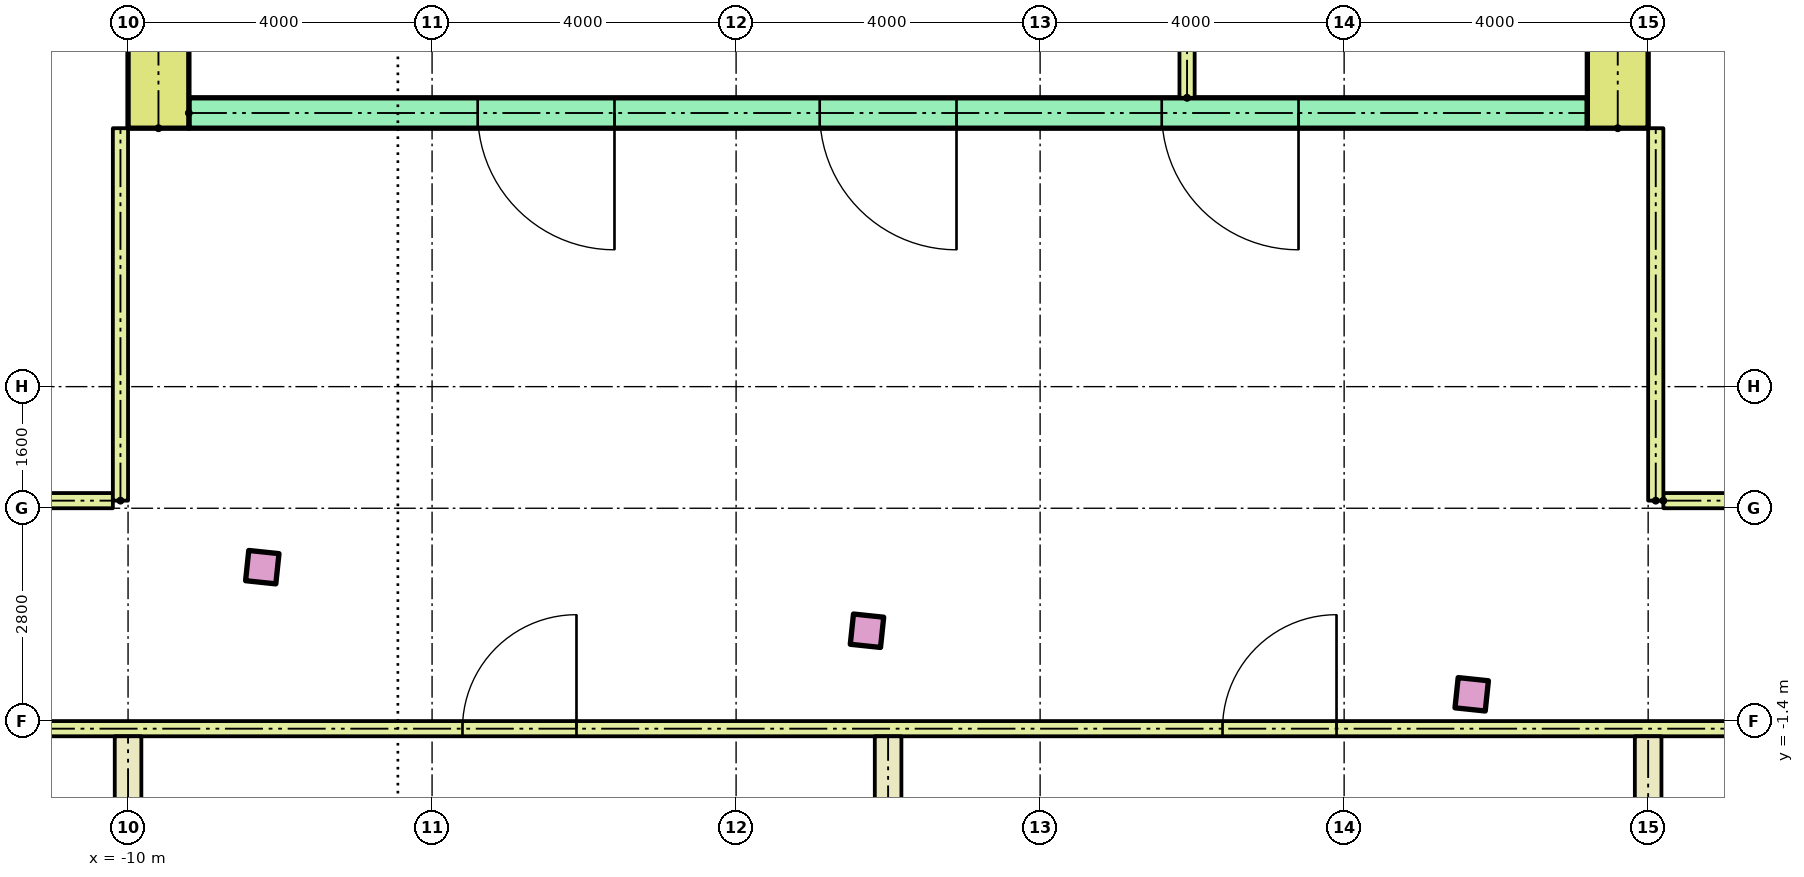
"""IFC4 building model, lengths in metres.
Left out: names, types, materials, properties, quantities, classifications, styles, units other than length and angle.
Written with IfcOpenShell. Run it as: python <this file> out.ifc"""

import sys

from ifc_helpers import new_model, si_unit, direction, frame, frame_2d, origin, origin_2d, place, context, subcontext, project, spatial, rectangle, extrude, element, fill, save


model = new_model("IFC4")
c1 = context("Model", 3, precision=1e-05, world=origin(), true_north=direction((0.0, 1.0)))
c2 = subcontext(c1, "Body", "Model", "MODEL_VIEW")
j1 = project(units=[si_unit("LENGTHUNIT", "METRE"), si_unit("PLANEANGLEUNIT", "RADIAN")], contexts=[c1])
p1 = place(None, origin())
s1 = spatial("IfcSite", under=j1, at=p1, CompositionType="ELEMENT")
p2 = place(p1, origin())
s2 = spatial("IfcBuilding", under=s1, at=p2, CompositionType="ELEMENT")
p3 = place(p2, frame((0.0, 0.0, 309.2)))
s3 = spatial("IfcBuildingStorey", under=s2, at=p3, CompositionType="ELEMENT", Elevation=309.2)
for number, where, z_axis, x_axis in (
    (1, (-8.234, 0.625, 0.0), (0.0, 0.0, 1.0), (0.995, -0.105, 0.0)),
    (2, (-0.278, -0.211, 0.0), (0.0, 0.0, 1.0), (0.995, -0.105, 0.0)),
    (3, (7.678, -1.048, 0.0), (0.0, 0.0, 1.0), (0.995, -0.105, 0.0)),
):
    element("IfcColumn", number, at=place(p3, frame(where, z_axis=z_axis, x_axis=x_axis)), inside=s3, PredefinedType="COLUMN", context=c2, shape_type="SweptSolid", body=[
        extrude(rectangle(XDim=0.4, YDim=0.4, at=origin_2d()), origin(), (0.0, 0.0, 1.0), 3.78),
    ])
for number, where, z_axis, x_axis in (
    (4, (-9.6, 6.4, 0.0), (0.0, 0.0, 1.0), (0.0, 1.0, 0.0)),
    (5, (9.6, 6.4, 0.0), (0.0, 0.0, 1.0), (0.0, 1.0, 0.0)),
):
    element("IfcWall", number, at=place(p3, frame(where, z_axis=z_axis, x_axis=x_axis)), inside=s3, PredefinedType="SHEAR", context=c2, shape_type="SweptSolid", body=[
        extrude(rectangle(XDim=13.6, YDim=0.8, at=frame_2d((6.8, 0.0))), origin(), (0.0, 0.0, 1.0), 3.78),
    ])
p4 = place(p3, frame((-9.2, 6.6, 0.0)))
e6 = element("IfcWall", 6, at=p4, inside=s3, PredefinedType="SHEAR", context=c2, shape_type="SweptSolid", body=[
    extrude(rectangle(XDim=18.4, YDim=0.4, at=frame_2d((9.2, 0.0))), origin(), (0.0, 0.0, 1.0), 3.78),
])
p5 = place(p4, frame((8.3, 0.0, 0.0)))
e7 = element("IfcOpeningElement", 7, at=p5, cuts=e6, PredefinedType="OPENING", context=c2, shape_type="SweptSolid", body=[
    extrude(rectangle(XDim=1.8, YDim=2.1, at=frame_2d((0.9, 1.05))), frame((0.0, 0.21, 0.0), z_axis=(0.0, -1.0, 0.0), x_axis=(1.0, 0.0, 0.0)), (0.0, 0.0, 1.0), 0.42),
])
p6 = place(p4, frame((3.8, 0.0, 0.0)))
e8 = element("IfcOpeningElement", 8, at=p6, cuts=e6, PredefinedType="OPENING", context=c2, shape_type="SweptSolid", body=[
    extrude(rectangle(XDim=1.8, YDim=2.1, at=frame_2d((0.9, 1.05))), frame((0.0, 0.21, 0.0), z_axis=(0.0, -1.0, 0.0), x_axis=(1.0, 0.0, 0.0)), (0.0, 0.0, 1.0), 0.42),
])
p7 = place(p4, frame((12.8, 0.0, 0.0)))
e9 = element("IfcOpeningElement", 9, at=p7, cuts=e6, PredefinedType="OPENING", context=c2, shape_type="SweptSolid", body=[
    extrude(rectangle(XDim=1.8, YDim=2.1, at=frame_2d((0.9, 1.05))), frame((0.0, 0.21, 0.0), z_axis=(0.0, -1.0, 0.0), x_axis=(1.0, 0.0, 0.0)), (0.0, 0.0, 1.0), 0.42),
])
p8 = place(p3, frame((3.933, 6.8, 0.0), z_axis=(0.0, 0.0, 1.0), x_axis=(0.0, 1.0, 0.0)))
e10 = element("IfcWall", 10, at=p8, inside=s3, PredefinedType="PARTITIONING", context=c2, shape_type="SweptSolid", body=[
    extrude(rectangle(XDim=3.3, YDim=0.2, at=frame_2d((1.65, 0.0))), origin(), (0.0, 0.0, 1.0), 3.78),
])
p9 = place(p8, frame((1.1, 0.0, 0.0)))
e11 = element("IfcOpeningElement", 11, at=p9, cuts=e10, PredefinedType="OPENING", context=c2, shape_type="SweptSolid", body=[
    extrude(rectangle(XDim=1.1, YDim=2.1, at=frame_2d((0.55, 1.05))), frame((0.0, 0.11, 0.0), z_axis=(0.0, -1.0, 0.0), x_axis=(1.0, 0.0, 0.0)), (0.0, 0.0, 1.0), 0.22),
])
p10 = place(p3, frame((-17.8, -1.5, 0.0)))
e12 = element("IfcWall", 12, at=p10, inside=s3, PredefinedType="PARTITIONING", context=c2, shape_type="SweptSolid", body=[
    extrude(rectangle(XDim=48.759, YDim=0.2, at=frame_2d((24.379, 0.0))), origin(), (0.0, 0.0, 1.0), 3.78),
])
p11 = place(p10, frame((0.4, 0.0, 0.0)))
e13 = element("IfcOpeningElement", 13, at=p11, cuts=e12, PredefinedType="OPENING", context=c2, shape_type="SweptSolid", body=[
    extrude(rectangle(XDim=1.6, YDim=2.4, at=frame_2d((0.8, 1.2))), frame((0.0, 0.11, 0.0), z_axis=(0.0, -1.0, 0.0), x_axis=(1.0, 0.0, 0.0)), (0.0, 0.0, 1.0), 0.22),
])
p12 = place(p10, frame((12.2, 0.0, 0.0)))
e14 = element("IfcOpeningElement", 14, at=p12, cuts=e12, PredefinedType="OPENING", context=c2, shape_type="SweptSolid", body=[
    extrude(rectangle(XDim=1.5, YDim=2.1, at=frame_2d((0.75, 1.05))), frame((0.0, 0.11, 0.0), z_axis=(0.0, -1.0, 0.0), x_axis=(1.0, 0.0, 0.0)), (0.0, 0.0, 1.0), 0.22),
])
p13 = place(p10, frame((22.2, 0.0, 0.0)))
e15 = element("IfcOpeningElement", 15, at=p13, cuts=e12, PredefinedType="OPENING", context=c2, shape_type="SweptSolid", body=[
    extrude(rectangle(XDim=1.5, YDim=2.1, at=frame_2d((0.75, 1.05))), frame((0.0, 0.11, 0.0), z_axis=(0.0, -1.0, 0.0), x_axis=(1.0, 0.0, 0.0)), (0.0, 0.0, 1.0), 0.22),
])
p14 = place(p10, frame((37.0, 0.0, 0.0)))
e16 = element("IfcOpeningElement", 16, at=p14, cuts=e12, PredefinedType="OPENING", context=c2, shape_type="SweptSolid", body=[
    extrude(rectangle(XDim=1.6, YDim=2.4, at=frame_2d((0.8, 1.2))), frame((0.0, 0.11, 0.0), z_axis=(0.0, -1.0, 0.0), x_axis=(1.0, 0.0, 0.0)), (0.0, 0.0, 1.0), 0.22),
])
p15 = place(p3, frame((-17.8, 1.5, 0.0)))
e17 = element("IfcWall", 17, at=p15, inside=s3, PredefinedType="PARTITIONING", context=c2, shape_type="SweptSolid", body=[
    extrude(rectangle(XDim=7.6, YDim=0.2, at=frame_2d((3.8, 0.0))), origin(), (0.0, 0.0, 1.0), 3.78),
])
p16 = place(p15, frame((2.4, 0.0, 0.0)))
e18 = element("IfcOpeningElement", 18, at=p16, cuts=e17, PredefinedType="OPENING", context=c2, shape_type="SweptSolid", body=[
    extrude(rectangle(XDim=1.0, YDim=2.4, at=frame_2d((0.5, 1.2))), frame((0.0, 0.11, 0.0), z_axis=(0.0, -1.0, 0.0), x_axis=(1.0, 0.0, 0.0)), (0.0, 0.0, 1.0), 0.22),
])
p17 = place(p3, frame((10.2, 1.5, 0.0)))
e19 = element("IfcWall", 19, at=p17, inside=s3, PredefinedType="PARTITIONING", context=c2, shape_type="SweptSolid", body=[
    extrude(rectangle(XDim=21.074, YDim=0.2, at=frame_2d((10.537, 0.0))), origin(), (0.0, 0.0, 1.0), 3.78),
])
p18 = place(p17, frame((9.6, 0.0, 0.0)))
e20 = element("IfcOpeningElement", 20, at=p18, cuts=e19, PredefinedType="OPENING", context=c2, shape_type="SweptSolid", body=[
    extrude(rectangle(XDim=1.6, YDim=2.4, at=frame_2d((0.8, 1.2))), frame((0.0, 0.11, 0.0), z_axis=(0.0, -1.0, 0.0), x_axis=(1.0, 0.0, 0.0)), (0.0, 0.0, 1.0), 0.22),
])
for number, where, z_axis, x_axis in (
    (21, (-10.1, 1.5, 0.0), (0.0, 0.0, 1.0), (0.0, 1.0, 0.0)),
    (22, (10.1, 1.5, 0.0), (0.0, 0.0, 1.0), (0.0, 1.0, 0.0)),
):
    element("IfcWall", number, at=place(p3, frame(where, z_axis=z_axis, x_axis=x_axis)), inside=s3, PredefinedType="PARTITIONING", context=c2, shape_type="SweptSolid", body=[
        extrude(rectangle(XDim=4.9, YDim=0.2, at=frame_2d((2.45, 0.0))), origin(), (0.0, 0.0, 1.0), 3.78),
    ])
p19 = place(p3, frame((-10.0, -14.071, 0.0), z_axis=(0.0, 0.0, 1.0), x_axis=(0.0, 1.0, 0.0)))
e23 = element("IfcWall", 23, at=p19, inside=s3, PredefinedType="PARTITIONING", context=c2, shape_type="SweptSolid", body=[
    extrude(rectangle(XDim=12.471, YDim=0.35, at=frame_2d((6.235, 0.0))), origin(), (0.0, 0.0, 1.0), 3.78),
])
p20 = place(p3, frame((0.0, -15.122, 0.0), z_axis=(0.0, 0.0, 1.0), x_axis=(0.0, 1.0, 0.0)))
e24 = element("IfcWall", 24, at=p20, inside=s3, PredefinedType="PARTITIONING", context=c2, shape_type="SweptSolid", body=[
    extrude(rectangle(XDim=13.522, YDim=0.35, at=frame_2d((6.761, 0.0))), origin(), (0.0, 0.0, 1.0), 3.78),
])
p21 = place(p3, frame((10.0, -16.173, 0.0), z_axis=(0.0, 0.0, 1.0), x_axis=(0.0, 1.0, 0.0)))
e25 = element("IfcWall", 25, at=p21, inside=s3, PredefinedType="PARTITIONING", context=c2, shape_type="SweptSolid", body=[
    extrude(rectangle(XDim=14.573, YDim=0.35, at=frame_2d((7.287, 0.0))), origin(), (0.0, 0.0, 1.0), 3.78),
])
p22 = place(p5, frame((1.8, 0.0, 0.0), z_axis=(0.0, 0.0, 1.0), x_axis=(-1.0, 0.0, 0.0)))
e26 = element("IfcDoor", 26, at=p22, inside=s3, OperationType="DOUBLE_DOOR_SINGLE_SWING", PredefinedType="DOOR", context=c2, shape_type="SweptSolid", body=[
    extrude(rectangle(XDim=1.8, YDim=2.1, at=frame_2d((0.9, 1.05))), frame((0.0, 0.025, 0.0), z_axis=(0.0, -1.0, 0.0), x_axis=(1.0, 0.0, 0.0)), (0.0, 0.0, 1.0), 0.05),
])
fill(e7, e26)
p23 = place(p6, frame((1.8, 0.0, 0.0), z_axis=(0.0, 0.0, 1.0), x_axis=(-1.0, 0.0, 0.0)))
e27 = element("IfcDoor", 27, at=p23, inside=s3, OperationType="DOUBLE_DOOR_SINGLE_SWING", PredefinedType="DOOR", context=c2, shape_type="SweptSolid", body=[
    extrude(rectangle(XDim=1.8, YDim=2.1, at=frame_2d((0.9, 1.05))), frame((0.0, 0.025, 0.0), z_axis=(0.0, -1.0, 0.0), x_axis=(1.0, 0.0, 0.0)), (0.0, 0.0, 1.0), 0.05),
])
fill(e8, e27)
p24 = place(p7, frame((1.8, 0.0, 0.0), z_axis=(0.0, 0.0, 1.0), x_axis=(-1.0, 0.0, 0.0)))
e28 = element("IfcDoor", 28, at=p24, inside=s3, OperationType="DOUBLE_DOOR_SINGLE_SWING", PredefinedType="DOOR", context=c2, shape_type="SweptSolid", body=[
    extrude(rectangle(XDim=1.8, YDim=2.1, at=frame_2d((0.9, 1.05))), frame((0.0, 0.025, 0.0), z_axis=(0.0, -1.0, 0.0), x_axis=(1.0, 0.0, 0.0)), (0.0, 0.0, 1.0), 0.05),
])
fill(e9, e28)
p25 = place(p12, origin())
e29 = element("IfcDoor", 29, at=p25, inside=s3, OperationType="DOUBLE_DOOR_SINGLE_SWING", PredefinedType="DOOR", context=c2, shape_type="SweptSolid", body=[
    extrude(rectangle(XDim=1.5, YDim=2.1, at=frame_2d((0.75, 1.05))), frame((0.0, 0.025, 0.0), z_axis=(0.0, -1.0, 0.0), x_axis=(1.0, 0.0, 0.0)), (0.0, 0.0, 1.0), 0.05),
])
fill(e14, e29)
p26 = place(p13, origin())
e30 = element("IfcDoor", 30, at=p26, inside=s3, OperationType="DOUBLE_DOOR_SINGLE_SWING", PredefinedType="DOOR", context=c2, shape_type="SweptSolid", body=[
    extrude(rectangle(XDim=1.5, YDim=2.1, at=frame_2d((0.75, 1.05))), frame((0.0, 0.025, 0.0), z_axis=(0.0, -1.0, 0.0), x_axis=(1.0, 0.0, 0.0)), (0.0, 0.0, 1.0), 0.05),
])
fill(e15, e30)
save(model, sys.argv[1])
